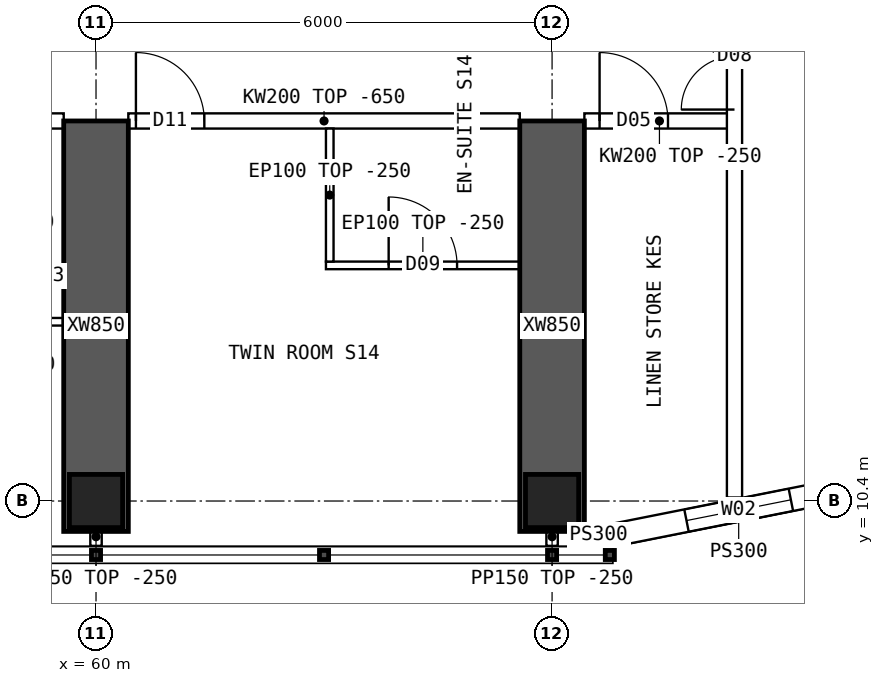
"""IFC4 building model, lengths in metres.
Left out: names, types, materials, properties, quantities, classifications, styles, units other than length and angle.
Written with IfcOpenShell. Run it as: python <this file> out.ifc"""

import sys

from ifc_helpers import new_model, si_unit, direction, frame, frame_2d, origin, origin_2d, place, context, subcontext, project, spatial, polyline, rectangle, hollow_rectangle, outline, extrude, element, fill, save


model = new_model("IFC4")
c1 = context("Model", 3, precision=1e-05, world=origin(), true_north=direction((0.0, 1.0)))
c2 = subcontext(c1, "Body", "Model", "MODEL_VIEW")
j1 = project(units=[si_unit("LENGTHUNIT", "METRE"), si_unit("PLANEANGLEUNIT", "RADIAN")], contexts=[c1])
p1 = place(None, origin())
s1 = spatial("IfcSite", under=j1, at=p1, CompositionType="ELEMENT")
p2 = place(p1, origin())
s2 = spatial("IfcBuilding", under=s1, at=p2, CompositionType="ELEMENT")
p3 = place(p2, frame((0.0, 0.0, 193.6)))
s3 = spatial("IfcBuildingStorey", under=s2, at=p3, CompositionType="ELEMENT", Elevation=193.6)
for number, where, z_axis, x_axis in (
    (1, (60.0, 10.4, 0.0), (0.0, 0.0, 1.0), (1.0, 0.0, 0.0)),
    (2, (66.0, 10.4, 0.0), (0.0, 0.0, 1.0), (1.0, 0.0, 0.0)),
):
    element("IfcColumn", number, at=place(p3, frame(where, z_axis=z_axis, x_axis=x_axis)), inside=s3, PredefinedType="COLUMN", context=c2, shape_type="SweptSolid", body=[
        extrude(hollow_rectangle(XDim=0.7, YDim=0.7, WallThickness=0.07, at=origin_2d()), origin(), (0.0, 0.0, 1.0), 3.75),
    ])
for number, where, z_axis, x_axis in (
    (3, (60.0, 10.0, 0.0), (0.0, 0.0, 1.0), (0.0, 1.0, 0.0)),
    (4, (66.0, 10.0, 0.0), (0.0, 0.0, 1.0), (0.0, 1.0, 0.0)),
):
    element("IfcWall", number, at=place(p3, frame(where, z_axis=z_axis, x_axis=x_axis)), inside=s3, PredefinedType="SHEAR", context=c2, shape_type="SweptSolid", body=[
        extrude(rectangle(XDim=5.4, YDim=0.85, at=frame_2d((2.7, 0.0))), origin(), (0.0, 0.0, 1.0), 3.75),
    ])
p4 = place(p3, frame((66.8, 9.95, 0.0), z_axis=(0.0, 0.0, 1.0), x_axis=(0.98078325777, 0.195100490205, 0.0)))
e5 = element("IfcWall", 5, at=p4, inside=s3, PredefinedType="SOLIDWALL", context=c2, shape_type="SweptSolid", body=[
    extrude(outline(polyline([(-0.03, -0.15), (3.405, -0.15), (3.345, 0.15), (0.03, 0.15), (-0.03, -0.15)])), origin(), (0.0, 0.0, 1.0), 3.5),
])
p5 = place(p4, frame((0.988, 0.0, 0.9)))
e6 = element("IfcOpeningElement", 6, at=p5, cuts=e5, PredefinedType="OPENING", context=c2, shape_type="SweptSolid", body=[
    extrude(rectangle(XDim=1.4, YDim=1.8, at=frame_2d((0.7, 0.9))), frame((0.0, 0.16, 0.0), z_axis=(0.0, -1.0, 0.0), x_axis=(1.0, 0.0, 0.0)), (0.0, 0.0, 1.0), 0.32),
])
p6 = place(p3, frame((66.8, 9.95, 0.0), z_axis=(0.0, 0.0, 1.0), x_axis=(-1.0, 0.0, 0.0)))
e7 = element("IfcWall", 7, at=p6, inside=s3, PredefinedType="SOLIDWALL", context=c2, shape_type="SweptSolid", body=[
    extrude(rectangle(XDim=0.375, YDim=0.3, at=frame_2d((0.188, 0.0))), origin(), (0.0, 0.0, 1.0), 3.5),
])
p7 = place(p3, frame((54.425, 15.4, 0.0), z_axis=(0.0, 0.0, 1.0), x_axis=(1.0, 0.0, 0.0)))
e8 = element("IfcWall", 8, at=p7, inside=s3, PredefinedType="SOLIDWALL", context=c2, shape_type="SweptSolid", body=[
    extrude(outline(polyline([(0.0, 0.0), (5.15, 0.0), (5.15, 3.1), (0.0, 3.1), (0.0, 0.0)])), frame((0.0, 0.1, 0.0), z_axis=(0.0, -1.0, 0.0), x_axis=(1.0, 0.0, 0.0)), (0.0, 0.0, 1.0), 0.2),
])
p8 = place(p7, frame((1.3, 0.0, 0.0)))
e9 = element("IfcOpeningElement", 9, at=p8, cuts=e8, PredefinedType="OPENING", context=c2, shape_type="SweptSolid", body=[
    extrude(rectangle(XDim=0.9, YDim=2.1, at=frame_2d((0.45, 1.05))), frame((0.0, 0.11, 0.0), z_axis=(0.0, -1.0, 0.0), x_axis=(1.0, 0.0, 0.0)), (0.0, 0.0, 1.0), 0.22),
])
p9 = place(p7, frame((2.75, 0.0, 0.0)))
e10 = element("IfcOpeningElement", 10, at=p9, cuts=e8, PredefinedType="OPENING", context=c2, shape_type="SweptSolid", body=[
    extrude(rectangle(XDim=0.9, YDim=2.1, at=frame_2d((0.45, 1.05))), frame((0.0, 0.11, 0.0), z_axis=(0.0, -1.0, 0.0), x_axis=(1.0, 0.0, 0.0)), (0.0, 0.0, 1.0), 0.22),
])
p10 = place(p3, frame((60.425, 15.4, 0.0), z_axis=(0.0, 0.0, 1.0), x_axis=(1.0, 0.0, 0.0)))
e11 = element("IfcWall", 11, at=p10, inside=s3, PredefinedType="SOLIDWALL", context=c2, shape_type="SweptSolid", body=[
    extrude(outline(polyline([(0.0, 0.0), (5.15, 0.0), (5.15, 3.1), (0.0, 3.1), (0.0, 0.0)])), frame((0.0, 0.1, 0.0), z_axis=(0.0, -1.0, 0.0), x_axis=(1.0, 0.0, 0.0)), (0.0, 0.0, 1.0), 0.2),
])
p11 = place(p10, frame((0.1, 0.0, 0.0)))
e12 = element("IfcOpeningElement", 12, at=p11, cuts=e11, PredefinedType="OPENING", context=c2, shape_type="SweptSolid", body=[
    extrude(rectangle(XDim=0.9, YDim=2.1, at=frame_2d((0.45, 1.05))), frame((0.0, 0.11, 0.0), z_axis=(0.0, -1.0, 0.0), x_axis=(1.0, 0.0, 0.0)), (0.0, 0.0, 1.0), 0.22),
])
p12 = place(p3, frame((66.425, 15.4, 0.0), z_axis=(0.0, 0.0, 1.0), x_axis=(1.0, 0.0, 0.0)))
e13 = element("IfcWall", 13, at=p12, inside=s3, PredefinedType="SOLIDWALL", context=c2, shape_type="SweptSolid", body=[
    extrude(rectangle(XDim=1.975, YDim=0.2, at=frame_2d((0.987, 0.0))), origin(), (0.0, 0.0, 1.0), 3.5),
])
p13 = place(p12, frame((0.2, 0.0, 0.0)))
e14 = element("IfcOpeningElement", 14, at=p13, cuts=e13, PredefinedType="OPENING", context=c2, shape_type="SweptSolid", body=[
    extrude(rectangle(XDim=0.9, YDim=2.1, at=frame_2d((0.45, 1.05))), frame((0.0, 0.11, 0.0), z_axis=(0.0, -1.0, 0.0), x_axis=(1.0, 0.0, 0.0)), (0.0, 0.0, 1.0), 0.22),
])
p14 = place(p3, frame((59.575, 12.758, 0.0), z_axis=(0.0, 0.0, 1.0), x_axis=(-1.0, 0.0, 0.0)))
e15 = element("IfcWall", 15, at=p14, inside=s3, PredefinedType="PARTITIONING", context=c2, shape_type="SweptSolid", body=[
    extrude(rectangle(XDim=1.25, YDim=0.1, at=frame_2d((0.625, 0.0))), origin(), (0.0, 0.0, 1.0), 3.5),
])
p15 = place(p14, frame((0.175, 0.0, 0.0)))
e16 = element("IfcOpeningElement", 16, at=p15, cuts=e15, PredefinedType="OPENING", context=c2, shape_type="SweptSolid", body=[
    extrude(rectangle(XDim=0.9, YDim=2.1, at=frame_2d((0.45, 1.05))), frame((0.0, 0.06, 0.0), z_axis=(0.0, -1.0, 0.0), x_axis=(1.0, 0.0, 0.0)), (0.0, 0.0, 1.0), 0.12),
])
p16 = place(p3, frame((65.575, 13.5, 0.0), z_axis=(0.0, 0.0, 1.0), x_axis=(-1.0, 0.0, 0.0)))
e17 = element("IfcWall", 17, at=p16, inside=s3, PredefinedType="PARTITIONING", context=c2, shape_type="SweptSolid", body=[
    extrude(rectangle(XDim=2.55, YDim=0.1, at=frame_2d((1.275, 0.0))), origin(), (0.0, 0.0, 1.0), 3.5),
])
p17 = place(p16, frame((0.825, 0.0, 0.0)))
e18 = element("IfcOpeningElement", 18, at=p17, cuts=e17, PredefinedType="OPENING", context=c2, shape_type="SweptSolid", body=[
    extrude(rectangle(XDim=0.9, YDim=2.1, at=frame_2d((0.45, 1.05))), frame((0.0, 0.06, 0.0), z_axis=(0.0, -1.0, 0.0), x_axis=(1.0, 0.0, 0.0)), (0.0, 0.0, 1.0), 0.12),
])
p18 = place(p3, frame((63.075, 13.55, 0.0), z_axis=(0.0, 0.0, 1.0), x_axis=(0.0, 1.0, 0.0)))
e19 = element("IfcWall", 19, at=p18, inside=s3, PredefinedType="PARTITIONING", context=c2, shape_type="SweptSolid", body=[
    extrude(outline(polyline([(0.0, 0.0), (1.75, 0.0), (1.75, 3.1), (1.702, 3.1), (1.7, 3.5), (0.0, 3.5), (0.0, 0.0)])), frame((0.0, 0.05, 0.0), z_axis=(0.0, -1.0, 0.0), x_axis=(1.0, 0.0, 0.0)), (0.0, 0.0, 1.0), 0.1),
])
p19 = place(p3, frame((68.4, 10.446, 0.0), z_axis=(0.0, 0.0, 1.0), x_axis=(0.0, 1.0, 0.0)))
e20 = element("IfcWall", 20, at=p19, inside=s3, PredefinedType="SOLIDWALL", context=c2, shape_type="SweptSolid", body=[
    extrude(rectangle(XDim=43.107, YDim=0.2, at=frame_2d((21.554, 0.0))), origin(), (0.0, 0.0, 1.0), 3.5),
])
p20 = place(p19, frame((27.994, 0.0, 0.0)))
e21 = element("IfcOpeningElement", 21, at=p20, cuts=e20, PredefinedType="OPENING", context=c2, shape_type="SweptSolid", body=[
    extrude(rectangle(XDim=1.2, YDim=2.1, at=frame_2d((0.6, 1.05))), frame((0.0, 0.11, 0.0), z_axis=(0.0, -1.0, 0.0), x_axis=(1.0, 0.0, 0.0)), (0.0, 0.0, 1.0), 0.22),
])
p21 = place(p19, frame((5.104, 0.0, 0.0)))
e22 = element("IfcOpeningElement", 22, at=p21, cuts=e20, PredefinedType="OPENING", context=c2, shape_type="SweptSolid", body=[
    extrude(rectangle(XDim=1.4, YDim=2.1, at=frame_2d((0.7, 1.05))), frame((0.0, 0.11, 0.0), z_axis=(0.0, -1.0, 0.0), x_axis=(1.0, 0.0, 0.0)), (0.0, 0.0, 1.0), 0.22),
])
p22 = place(p19, frame((36.504, 0.0, 0.0)))
e23 = element("IfcOpeningElement", 23, at=p22, cuts=e20, PredefinedType="OPENING", context=c2, shape_type="SweptSolid", body=[
    extrude(rectangle(XDim=1.4, YDim=2.1, at=frame_2d((0.7, 1.05))), frame((0.0, 0.11, 0.0), z_axis=(0.0, -1.0, 0.0), x_axis=(1.0, 0.0, 0.0)), (0.0, 0.0, 1.0), 0.22),
])
for number, where, z_axis, x_axis in (
    (24, (60.0, 10.05, 0.0), (0.0, 0.0, 1.0), (0.0, -1.0, 0.0)),
    (25, (66.0, 10.05, 0.0), (0.0, 0.0, 1.0), (0.0, -1.0, 0.0)),
):
    element("IfcWall", number, at=place(p3, frame(where, z_axis=z_axis, x_axis=x_axis)), inside=s3, PredefinedType="PARTITIONING", context=c2, shape_type="SweptSolid", body=[
        extrude(rectangle(XDim=0.24, YDim=0.15, at=frame_2d((0.12, 0.0))), origin(), (0.0, 0.0, 1.0), 3.5),
    ])
p23 = place(p5, origin())
e26 = element("IfcWindow", 26, at=p23, inside=s3, PartitioningType="SINGLE_PANEL", PredefinedType="WINDOW", context=c2, shape_type="SweptSolid", body=[
    extrude(rectangle(XDim=1.4, YDim=1.8, at=frame_2d((0.7, 0.9))), frame((0.0, 0.03, 0.0), z_axis=(0.0, -1.0, 0.0), x_axis=(1.0, 0.0, 0.0)), (0.0, 0.0, 1.0), 0.06),
])
fill(e6, e26)
p24 = place(p17, origin())
e27 = element("IfcDoor", 27, at=p24, inside=s3, OperationType="SINGLE_SWING_RIGHT", PredefinedType="DOOR", context=c2, shape_type="SweptSolid", body=[
    extrude(rectangle(XDim=0.9, YDim=2.1, at=frame_2d((0.45, 1.05))), frame((0.0, 0.025, 0.0), z_axis=(0.0, -1.0, 0.0), x_axis=(1.0, 0.0, 0.0)), (0.0, 0.0, 1.0), 0.05),
])
fill(e18, e27)
p25 = place(p11, origin())
e28 = element("IfcDoor", 28, at=p25, inside=s3, OperationType="SINGLE_SWING_LEFT", PredefinedType="DOOR", context=c2, shape_type="SweptSolid", body=[
    extrude(rectangle(XDim=0.9, YDim=2.1, at=frame_2d((0.45, 1.05))), frame((0.0, 0.025, 0.0), z_axis=(0.0, -1.0, 0.0), x_axis=(1.0, 0.0, 0.0)), (0.0, 0.0, 1.0), 0.05),
])
fill(e12, e28)
p26 = place(p21, origin())
e29 = element("IfcDoor", 29, at=p26, inside=s3, OperationType="DOUBLE_DOOR_SINGLE_SWING", PredefinedType="DOOR", context=c2, shape_type="SweptSolid", body=[
    extrude(rectangle(XDim=1.4, YDim=2.1, at=frame_2d((0.7, 1.05))), frame((0.0, 0.025, 0.0), z_axis=(0.0, -1.0, 0.0), x_axis=(1.0, 0.0, 0.0)), (0.0, 0.0, 1.0), 0.05),
])
fill(e22, e29)
p27 = place(p13, origin())
e30 = element("IfcDoor", 30, at=p27, inside=s3, OperationType="SINGLE_SWING_LEFT", PredefinedType="DOOR", context=c2, shape_type="SweptSolid", body=[
    extrude(rectangle(XDim=0.9, YDim=2.1, at=frame_2d((0.45, 1.05))), frame((0.0, 0.025, 0.0), z_axis=(0.0, -1.0, 0.0), x_axis=(1.0, 0.0, 0.0)), (0.0, 0.0, 1.0), 0.05),
])
fill(e14, e30)
save(model, sys.argv[1])
